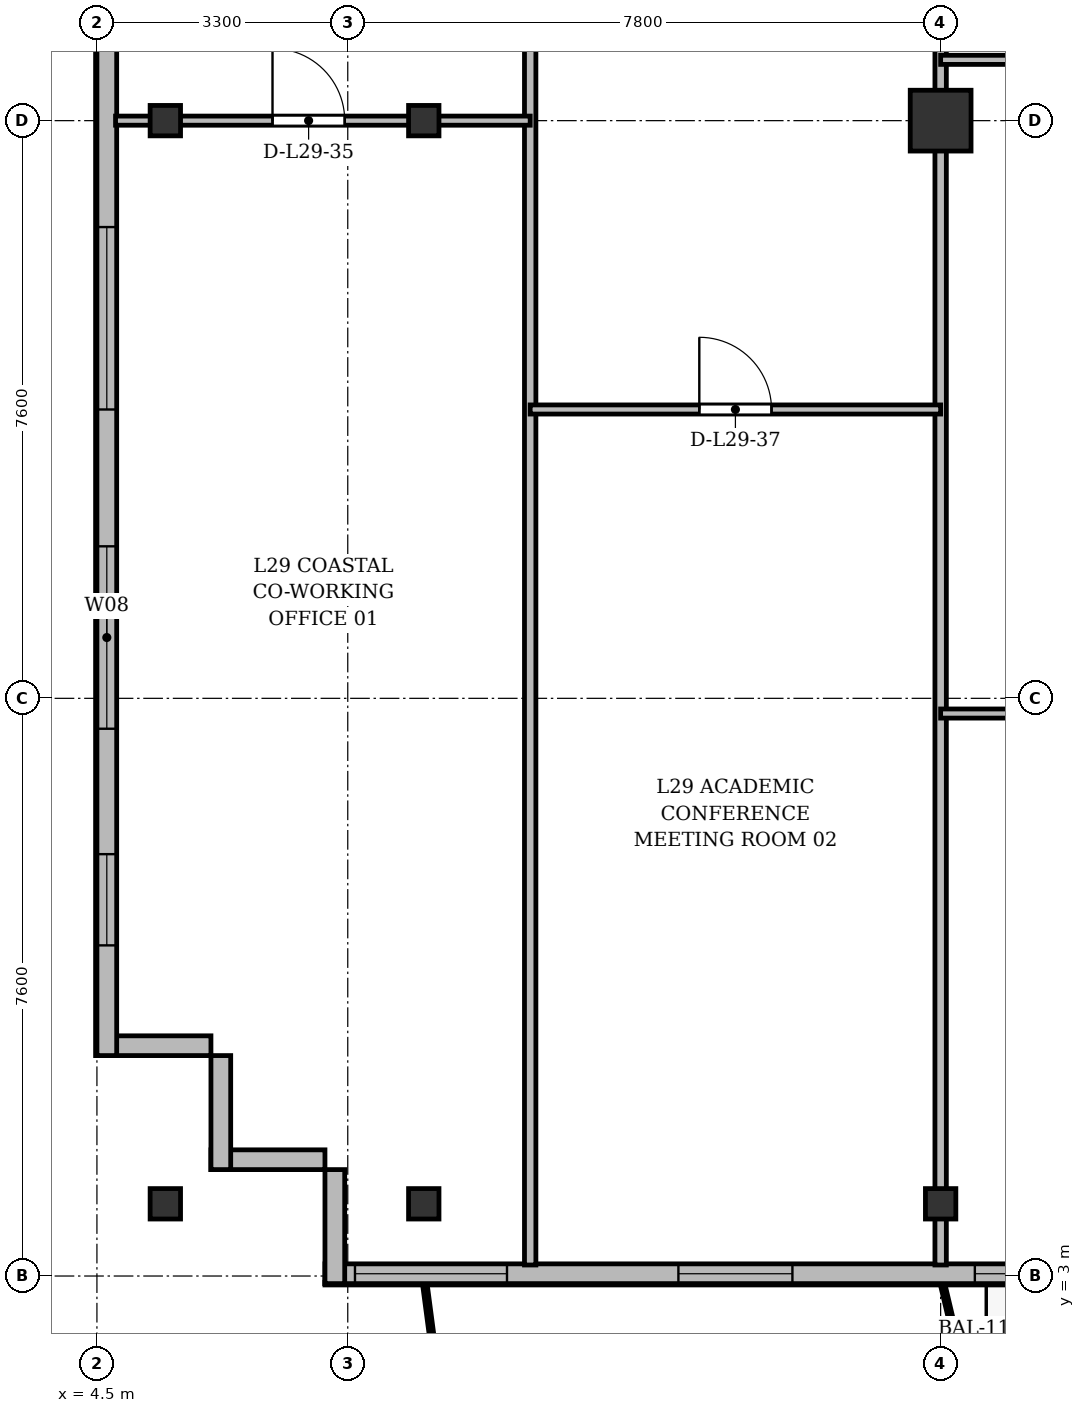
"""IFC4 building model, lengths in metres.
Left out: names, types, materials, properties, quantities, classifications, styles, units other than length and angle.
Written with IfcOpenShell. Run it as: python <this file> out.ifc"""

import sys

from ifc_helpers import new_model, si_unit, direction, frame, frame_2d, origin, origin_2d, place, context, subcontext, project, spatial, rectangle, i_section, extrude, source, transform, mapped, element, fill, save


model = new_model("IFC4")
c1 = context("Model", 3, precision=1e-05, world=origin(), true_north=direction((0.0, 1.0)))
c2 = subcontext(c1, "Body", "Model", "MODEL_VIEW")
j1 = project(units=[si_unit("LENGTHUNIT", "METRE"), si_unit("PLANEANGLEUNIT", "RADIAN")], contexts=[c1])
p1 = place(None, origin())
s1 = spatial("IfcSite", under=j1, at=p1, CompositionType="ELEMENT")
p2 = place(p1, origin())
s2 = spatial("IfcBuilding", under=s1, at=p2, CompositionType="ELEMENT")
p3 = place(p2, frame((0.0, 0.0, 114.1)))
s3 = spatial("IfcBuildingStorey", under=s2, at=p3, CompositionType="ELEMENT", Elevation=114.1)
m1 = source(origin(), c2, "Body", "SweptSolid", [
    extrude(i_section(OverallWidth=0.4, OverallDepth=0.4, WebThickness=0.022, FlangeThickness=0.035, at=origin_2d()), origin(), (0.0, 0.0, 1.0), 3.6),
])
for number, where, z_axis, x_axis in (
    (1, (5.4, 3.95, 0.0), (0.0, 0.0, 1.0), (1.0, 0.0, 0.0)),
    (2, (5.4, 18.2, 0.0), (0.0, 0.0, 1.0), (1.0, 0.0, 0.0)),
    (3, (8.8, 3.95, 0.0), (0.0, 0.0, 1.0), (1.0, 0.0, 0.0)),
    (4, (8.8, 18.2, 0.0), (0.0, 0.0, 1.0), (1.0, 0.0, 0.0)),
    (5, (15.6, 3.95, 0.0), (0.0, 0.0, 1.0), (1.0, 0.0, 0.0)),
):
    element("IfcColumn", number, at=place(p3, frame(where, z_axis=z_axis, x_axis=x_axis)), inside=s3, PredefinedType="COLUMN", context=c2, shape_type="MappedRepresentation", body=[
        mapped(m1, transform((0.0, 0.0, 0.0), x_axis=(1.0, 0.0, 0.0), y_axis=(0.0, 1.0, 0.0), z_axis=(0.0, 0.0, 1.0), scale=1.0)),
    ])
m2 = source(origin(), c2, "Body", "SweptSolid", [
    extrude(rectangle(XDim=0.8, YDim=0.8, at=origin_2d()), origin(), (0.0, 0.0, 1.0), 3.6),
])
p4 = place(p3, frame((15.6, 18.2, 0.0), z_axis=(0.0, 0.0, 1.0), x_axis=(1.0, 0.0, 0.0)))
e6 = element("IfcColumn", 6, at=p4, inside=s3, PredefinedType="COLUMN", context=c2, shape_type="MappedRepresentation", body=[
    mapped(m2, transform((0.0, 0.0, 0.0), x_axis=(1.0, 0.0, 0.0), y_axis=(0.0, 1.0, 0.0), z_axis=(0.0, 0.0, 1.0), scale=1.0)),
])
for number, where, z_axis, x_axis in (
    (7, (7.5, 4.53, 0.0), (0.0, 0.0, 1.0), (-1.0, 0.0, 0.0)),
    (8, (6.13, 4.4, 0.0), (0.0, 0.0, 1.0), (0.0, 1.0, 0.0)),
):
    element("IfcWall", number, at=place(p3, frame(where, z_axis=z_axis, x_axis=x_axis)), inside=s3, PredefinedType="SOLIDWALL", context=c2, shape_type="SweptSolid", body=[
        extrude(rectangle(XDim=1.5, YDim=0.26, at=frame_2d((0.75, 0.0))), origin(), (0.0, 0.0, 1.0), 3.34),
    ])
p5 = place(p3, frame((6.0, 6.03, 0.0), z_axis=(0.0, 0.0, 1.0), x_axis=(-1.0, 0.0, 0.0)))
e9 = element("IfcWall", 9, at=p5, inside=s3, PredefinedType="SOLIDWALL", context=c2, shape_type="SweptSolid", body=[
    extrude(rectangle(XDim=1.5, YDim=0.26, at=frame_2d((0.75, 0.0))), origin(), (0.0, 0.0, 1.0), 2.84),
])
p6 = place(p3, frame((4.63, 5.9, 0.0), z_axis=(0.0, 0.0, 1.0), x_axis=(0.0, 1.0, 0.0)))
e10 = element("IfcWall", 10, at=p6, inside=s3, PredefinedType="SOLIDWALL", context=c2, shape_type="SweptSolid", body=[
    extrude(rectangle(XDim=39.6, YDim=0.26, at=frame_2d((19.8, 0.0))), origin(), (0.0, 0.0, 1.0), 3.34),
])
p7 = place(p6, frame((1.45, 0.0, 0.92)))
e11 = element("IfcOpeningElement", 11, at=p7, cuts=e10, PredefinedType="OPENING", context=c2, shape_type="SweptSolid", body=[
    extrude(rectangle(XDim=1.2, YDim=1.65, at=frame_2d((0.6, 0.825))), frame((0.0, 0.14, 0.0), z_axis=(0.0, -1.0, 0.0), x_axis=(1.0, 0.0, 0.0)), (0.0, 0.0, 1.0), 0.28),
])
p8 = place(p6, frame((4.3, 0.0, 0.92)))
e12 = element("IfcOpeningElement", 12, at=p8, cuts=e10, PredefinedType="OPENING", context=c2, shape_type="SweptSolid", body=[
    extrude(rectangle(XDim=2.4, YDim=2.1, at=frame_2d((1.2, 1.05))), frame((0.0, 0.14, 0.0), z_axis=(0.0, -1.0, 0.0), x_axis=(1.0, 0.0, 0.0)), (0.0, 0.0, 1.0), 0.28),
])
p9 = place(p6, frame((8.5, 0.0, 0.92)))
e13 = element("IfcOpeningElement", 13, at=p9, cuts=e10, PredefinedType="OPENING", context=c2, shape_type="SweptSolid", body=[
    extrude(rectangle(XDim=2.4, YDim=2.1, at=frame_2d((1.2, 1.05))), frame((0.0, 0.14, 0.0), z_axis=(0.0, -1.0, 0.0), x_axis=(1.0, 0.0, 0.0)), (0.0, 0.0, 1.0), 0.28),
])
p10 = place(p6, frame((15.7, 0.0, 0.92)))
e14 = element("IfcOpeningElement", 14, at=p10, cuts=e10, PredefinedType="OPENING", context=c2, shape_type="SweptSolid", body=[
    extrude(rectangle(XDim=2.4, YDim=2.1, at=frame_2d((1.2, 1.05))), frame((0.0, 0.14, 0.0), z_axis=(0.0, -1.0, 0.0), x_axis=(1.0, 0.0, 0.0)), (0.0, 0.0, 1.0), 0.28),
])
p11 = place(p6, frame((33.9, 0.0, 0.92)))
e15 = element("IfcOpeningElement", 15, at=p11, cuts=e10, PredefinedType="OPENING", context=c2, shape_type="SweptSolid", body=[
    extrude(rectangle(XDim=1.2, YDim=1.65, at=frame_2d((0.6, 0.825))), frame((0.0, 0.14, 0.0), z_axis=(0.0, -1.0, 0.0), x_axis=(1.0, 0.0, 0.0)), (0.0, 0.0, 1.0), 0.28),
])
p12 = place(p6, frame((37.25, 0.0, 0.92)))
e16 = element("IfcOpeningElement", 16, at=p12, cuts=e10, PredefinedType="OPENING", context=c2, shape_type="SweptSolid", body=[
    extrude(rectangle(XDim=1.2, YDim=1.65, at=frame_2d((0.6, 0.825))), frame((0.0, 0.14, 0.0), z_axis=(0.0, -1.0, 0.0), x_axis=(1.0, 0.0, 0.0)), (0.0, 0.0, 1.0), 0.28),
])
p13 = place(p3, frame((66.9, 3.03, 0.0), z_axis=(0.0, 0.0, 1.0), x_axis=(-1.0, 0.0, 0.0)))
e17 = element("IfcWall", 17, at=p13, inside=s3, PredefinedType="SOLIDWALL", context=c2, shape_type="SweptSolid", body=[
    extrude(rectangle(XDim=59.4, YDim=0.26, at=frame_2d((29.7, 0.0))), origin(), (0.0, 0.0, 1.0), 3.34),
])
p14 = place(p13, frame((0.47, 0.0, 0.9)))
e18 = element("IfcOpeningElement", 18, at=p14, cuts=e17, PredefinedType="OPENING", context=c2, shape_type="SweptSolid", body=[
    extrude(rectangle(XDim=1.65, YDim=1.85, at=frame_2d((0.825, 0.925))), frame((0.0, 0.14, 0.0), z_axis=(0.0, -1.0, 0.0), x_axis=(1.0, 0.0, 0.0)), (0.0, 0.0, 1.0), 0.28),
])
p15 = place(p13, frame((4.4, 0.0, 0.9)))
e19 = element("IfcOpeningElement", 19, at=p15, cuts=e17, PredefinedType="OPENING", context=c2, shape_type="SweptSolid", body=[
    extrude(rectangle(XDim=1.8, YDim=1.8, at=frame_2d((0.9, 0.9))), frame((0.0, 0.14, 0.0), z_axis=(0.0, -1.0, 0.0), x_axis=(1.0, 0.0, 0.0)), (0.0, 0.0, 1.0), 0.28),
])
p16 = place(p13, frame((10.9, 0.0, 0.9)))
e20 = element("IfcOpeningElement", 20, at=p16, cuts=e17, PredefinedType="OPENING", context=c2, shape_type="SweptSolid", body=[
    extrude(rectangle(XDim=2.2, YDim=1.8, at=frame_2d((1.1, 0.9))), frame((0.0, 0.14, 0.0), z_axis=(0.0, -1.0, 0.0), x_axis=(1.0, 0.0, 0.0)), (0.0, 0.0, 1.0), 0.28),
])
p17 = place(p13, frame((16.92, 0.0, 0.0)))
e21 = element("IfcOpeningElement", 21, at=p17, cuts=e17, PredefinedType="OPENING", context=c2, shape_type="SweptSolid", body=[
    extrude(rectangle(XDim=1.2, YDim=2.2, at=frame_2d((0.6, 1.1))), frame((0.0, 0.14, 0.0), z_axis=(0.0, -1.0, 0.0), x_axis=(1.0, 0.0, 0.0)), (0.0, 0.0, 1.0), 0.28),
])
p18 = place(p13, frame((18.75, 0.0, 0.9)))
e22 = element("IfcOpeningElement", 22, at=p18, cuts=e17, PredefinedType="OPENING", context=c2, shape_type="SweptSolid", body=[
    extrude(rectangle(XDim=1.5, YDim=1.75, at=frame_2d((0.75, 0.875))), frame((0.0, 0.14, 0.0), z_axis=(0.0, -1.0, 0.0), x_axis=(1.0, 0.0, 0.0)), (0.0, 0.0, 1.0), 0.28),
])
p19 = place(p13, frame((21.075, 0.0, 0.9)))
e23 = element("IfcOpeningElement", 23, at=p19, cuts=e17, PredefinedType="OPENING", context=c2, shape_type="SweptSolid", body=[
    extrude(rectangle(XDim=1.65, YDim=1.85, at=frame_2d((0.825, 0.925))), frame((0.0, 0.14, 0.0), z_axis=(0.0, -1.0, 0.0), x_axis=(1.0, 0.0, 0.0)), (0.0, 0.0, 1.0), 0.28),
])
p20 = place(p13, frame((26.5, 0.0, 0.9)))
e24 = element("IfcOpeningElement", 24, at=p20, cuts=e17, PredefinedType="OPENING", context=c2, shape_type="SweptSolid", body=[
    extrude(rectangle(XDim=1.8, YDim=1.8, at=frame_2d((0.9, 0.9))), frame((0.0, 0.14, 0.0), z_axis=(0.0, -1.0, 0.0), x_axis=(1.0, 0.0, 0.0)), (0.0, 0.0, 1.0), 0.28),
])
p21 = place(p13, frame((32.45, 0.0, 0.9)))
e25 = element("IfcOpeningElement", 25, at=p21, cuts=e17, PredefinedType="OPENING", context=c2, shape_type="SweptSolid", body=[
    extrude(rectangle(XDim=2.2, YDim=1.8, at=frame_2d((1.1, 0.9))), frame((0.0, 0.14, 0.0), z_axis=(0.0, -1.0, 0.0), x_axis=(1.0, 0.0, 0.0)), (0.0, 0.0, 1.0), 0.28),
])
p22 = place(p13, frame((36.5, 0.0, 0.9)))
e26 = element("IfcOpeningElement", 26, at=p22, cuts=e17, PredefinedType="OPENING", context=c2, shape_type="SweptSolid", body=[
    extrude(rectangle(XDim=1.5, YDim=1.75, at=frame_2d((0.75, 0.875))), frame((0.0, 0.14, 0.0), z_axis=(0.0, -1.0, 0.0), x_axis=(1.0, 0.0, 0.0)), (0.0, 0.0, 1.0), 0.28),
])
p23 = place(p13, frame((39.6, 0.0, 0.9)))
e27 = element("IfcOpeningElement", 27, at=p23, cuts=e17, PredefinedType="OPENING", context=c2, shape_type="SweptSolid", body=[
    extrude(rectangle(XDim=2.0, YDim=1.95, at=frame_2d((1.0, 0.975))), frame((0.0, 0.14, 0.0), z_axis=(0.0, -1.0, 0.0), x_axis=(1.0, 0.0, 0.0)), (0.0, 0.0, 1.0), 0.28),
])
p24 = place(p13, frame((42.775, 0.0, 0.9)))
e28 = element("IfcOpeningElement", 28, at=p24, cuts=e17, PredefinedType="OPENING", context=c2, shape_type="SweptSolid", body=[
    extrude(rectangle(XDim=1.65, YDim=1.85, at=frame_2d((0.825, 0.925))), frame((0.0, 0.14, 0.0), z_axis=(0.0, -1.0, 0.0), x_axis=(1.0, 0.0, 0.0)), (0.0, 0.0, 1.0), 0.28),
])
p25 = place(p13, frame((46.435, 0.0, 0.0)))
e29 = element("IfcOpeningElement", 29, at=p25, cuts=e17, PredefinedType="OPENING", context=c2, shape_type="SweptSolid", body=[
    extrude(rectangle(XDim=1.2, YDim=2.2, at=frame_2d((0.6, 1.1))), frame((0.0, 0.14, 0.0), z_axis=(0.0, -1.0, 0.0), x_axis=(1.0, 0.0, 0.0)), (0.0, 0.0, 1.0), 0.28),
])
p26 = place(p13, frame((48.65, 0.0, 0.9)))
e30 = element("IfcOpeningElement", 30, at=p26, cuts=e17, PredefinedType="OPENING", context=c2, shape_type="SweptSolid", body=[
    extrude(rectangle(XDim=2.2, YDim=1.8, at=frame_2d((1.1, 0.9))), frame((0.0, 0.14, 0.0), z_axis=(0.0, -1.0, 0.0), x_axis=(1.0, 0.0, 0.0)), (0.0, 0.0, 1.0), 0.28),
])
p27 = place(p13, frame((53.25, 0.0, 0.9)))
e31 = element("IfcOpeningElement", 31, at=p27, cuts=e17, PredefinedType="OPENING", context=c2, shape_type="SweptSolid", body=[
    extrude(rectangle(XDim=1.5, YDim=1.75, at=frame_2d((0.75, 0.875))), frame((0.0, 0.14, 0.0), z_axis=(0.0, -1.0, 0.0), x_axis=(1.0, 0.0, 0.0)), (0.0, 0.0, 1.0), 0.28),
])
p28 = place(p13, frame((57.005, 0.0, 0.9)))
e32 = element("IfcOpeningElement", 32, at=p28, cuts=e17, PredefinedType="OPENING", context=c2, shape_type="SweptSolid", body=[
    extrude(rectangle(XDim=2.0, YDim=1.95, at=frame_2d((1.0, 0.975))), frame((0.0, 0.14, 0.0), z_axis=(0.0, -1.0, 0.0), x_axis=(1.0, 0.0, 0.0)), (0.0, 0.0, 1.0), 0.28),
])
p29 = place(p3, frame((7.63, 2.9, 0.0), z_axis=(0.0, 0.0, 1.0), x_axis=(0.0, 1.0, 0.0)))
e33 = element("IfcWall", 33, at=p29, inside=s3, PredefinedType="SOLIDWALL", context=c2, shape_type="SweptSolid", body=[
    extrude(rectangle(XDim=1.5, YDim=0.26, at=frame_2d((0.75, 0.0))), origin(), (0.0, 0.0, 1.0), 2.752),
])
p30 = place(p3, frame((10.2, 3.145, 0.0), z_axis=(0.0, 0.0, 1.0), x_axis=(0.0, 1.0, 0.0)))
e34 = element("IfcWall", 34, at=p30, inside=s3, PredefinedType="PARTITIONING", context=c2, shape_type="SweptSolid", body=[
    extrude(rectangle(XDim=24.455, YDim=0.15, at=frame_2d((12.228, 0.0))), origin(), (0.0, 0.0, 1.0), 2.752),
])
p31 = place(p3, frame((15.6, 3.145, 0.0), z_axis=(0.0, 0.0, 1.0), x_axis=(0.0, 1.0, 0.0)))
e35 = element("IfcWall", 35, at=p31, inside=s3, PredefinedType="PARTITIONING", context=c2, shape_type="SweptSolid", body=[
    extrude(rectangle(XDim=24.455, YDim=0.15, at=frame_2d((12.228, 0.0))), origin(), (0.0, 0.0, 1.0), 2.84),
])
p32 = place(p3, frame((4.745, 18.2, 0.0), z_axis=(0.0, 0.0, 1.0), x_axis=(1.0, 0.0, 0.0)))
e36 = element("IfcWall", 36, at=p32, inside=s3, PredefinedType="PARTITIONING", context=c2, shape_type="SweptSolid", body=[
    extrude(rectangle(XDim=5.455, YDim=0.12, at=frame_2d((2.728, 0.0))), origin(), (0.0, 0.0, 1.0), 2.752),
])
p33 = place(p32, frame((2.065, 0.0, 0.0)))
e37 = element("IfcOpeningElement", 37, at=p33, cuts=e36, PredefinedType="OPENING", context=c2, shape_type="SweptSolid", body=[
    extrude(rectangle(XDim=0.95, YDim=2.15, at=frame_2d((0.475, 1.075))), frame((0.0, 0.07, 0.0), z_axis=(0.0, -1.0, 0.0), x_axis=(1.0, 0.0, 0.0)), (0.0, 0.0, 1.0), 0.14),
])
p34 = place(p3, frame((10.2, 14.4, 0.0), z_axis=(0.0, 0.0, 1.0), x_axis=(1.0, 0.0, 0.0)))
e38 = element("IfcWall", 38, at=p34, inside=s3, PredefinedType="PARTITIONING", context=c2, shape_type="SweptSolid", body=[
    extrude(rectangle(XDim=5.4, YDim=0.12, at=frame_2d((2.7, 0.0))), origin(), (0.0, 0.0, 1.0), 2.84),
])
p35 = place(p34, frame((2.225, 0.0, 0.0)))
e39 = element("IfcOpeningElement", 39, at=p35, cuts=e38, PredefinedType="OPENING", context=c2, shape_type="SweptSolid", body=[
    extrude(rectangle(XDim=0.95, YDim=2.15, at=frame_2d((0.475, 1.075))), frame((0.0, 0.07, 0.0), z_axis=(0.0, -1.0, 0.0), x_axis=(1.0, 0.0, 0.0)), (0.0, 0.0, 1.0), 0.14),
])
p36 = place(p3, frame((15.6, 19.0, 0.0), z_axis=(0.0, 0.0, 1.0), x_axis=(1.0, 0.0, 0.0)))
e40 = element("IfcWall", 40, at=p36, inside=s3, PredefinedType="PARTITIONING", context=c2, shape_type="SweptSolid", body=[
    extrude(rectangle(XDim=6.2, YDim=0.12, at=frame_2d((3.1, 0.0))), origin(), (0.0, 0.0, 1.0), 2.84),
])
p37 = place(p36, frame((2.625, 0.0, 0.0)))
e41 = element("IfcOpeningElement", 41, at=p37, cuts=e40, PredefinedType="OPENING", context=c2, shape_type="SweptSolid", body=[
    extrude(rectangle(XDim=0.95, YDim=2.15, at=frame_2d((0.475, 1.075))), frame((0.0, 0.07, 0.0), z_axis=(0.0, -1.0, 0.0), x_axis=(1.0, 0.0, 0.0)), (0.0, 0.0, 1.0), 0.14),
])
p38 = place(p3, frame((15.6, 10.4, 0.0), z_axis=(0.0, 0.0, 1.0), x_axis=(1.0, 0.0, 0.0)))
e42 = element("IfcWall", 42, at=p38, inside=s3, PredefinedType="PARTITIONING", context=c2, shape_type="SweptSolid", body=[
    extrude(rectangle(XDim=3.1, YDim=0.12, at=frame_2d((1.55, 0.0))), origin(), (0.0, 0.0, 1.0), 2.84),
])
p39 = place(p38, frame((1.075, 0.0, 0.0)))
e43 = element("IfcOpeningElement", 43, at=p39, cuts=e42, PredefinedType="OPENING", context=c2, shape_type="SweptSolid", body=[
    extrude(rectangle(XDim=0.95, YDim=2.15, at=frame_2d((0.475, 1.075))), frame((0.0, 0.07, 0.0), z_axis=(0.0, -1.0, 0.0), x_axis=(1.0, 0.0, 0.0)), (0.0, 0.0, 1.0), 0.14),
])
m3 = source(origin(), c2, "Body", "SweptSolid", [
    extrude(rectangle(XDim=1.2, YDim=1.65, at=frame_2d((0.6, 0.825))), frame((0.0, 0.03, 0.0), z_axis=(0.0, -1.0, 0.0), x_axis=(1.0, 0.0, 0.0)), (0.0, 0.0, 1.0), 0.06),
])
p40 = place(p7, origin())
e44 = element("IfcWindow", 44, at=p40, inside=s3, PartitioningType="SINGLE_PANEL", PredefinedType="WINDOW", context=c2, shape_type="MappedRepresentation", body=[
    mapped(m3, transform((0.0, 0.0, 0.0), x_axis=(1.0, 0.0, 0.0), y_axis=(0.0, 1.0, 0.0), z_axis=(0.0, 0.0, 1.0), scale=1.0)),
])
fill(e11, e44)
m4 = source(origin(), c2, "Body", "SweptSolid", [
    extrude(rectangle(XDim=2.4, YDim=2.1, at=frame_2d((1.2, 1.05))), frame((0.0, 0.03, 0.0), z_axis=(0.0, -1.0, 0.0), x_axis=(1.0, 0.0, 0.0)), (0.0, 0.0, 1.0), 0.06),
])
p41 = place(p8, origin())
e45 = element("IfcWindow", 45, at=p41, inside=s3, PartitioningType="SINGLE_PANEL", PredefinedType="WINDOW", context=c2, shape_type="MappedRepresentation", body=[
    mapped(m4, transform((0.0, 0.0, 0.0), x_axis=(1.0, 0.0, 0.0), y_axis=(0.0, 1.0, 0.0), z_axis=(0.0, 0.0, 1.0), scale=1.0)),
])
fill(e12, e45)
p42 = place(p9, origin())
e46 = element("IfcWindow", 46, at=p42, inside=s3, PartitioningType="SINGLE_PANEL", PredefinedType="WINDOW", context=c2, shape_type="MappedRepresentation", body=[
    mapped(m4, transform((0.0, 0.0, 0.0), x_axis=(1.0, 0.0, 0.0), y_axis=(0.0, 1.0, 0.0), z_axis=(0.0, 0.0, 1.0), scale=1.0)),
])
fill(e13, e46)
m5 = source(origin(), c2, "Body", "SweptSolid", [
    extrude(rectangle(XDim=2.2, YDim=1.8, at=frame_2d((1.1, 0.9))), frame((0.0, 0.03, 0.0), z_axis=(0.0, -1.0, 0.0), x_axis=(1.0, 0.0, 0.0)), (0.0, 0.0, 1.0), 0.06),
])
p43 = place(p26, origin())
e47 = element("IfcWindow", 47, at=p43, inside=s3, PartitioningType="SINGLE_PANEL", PredefinedType="WINDOW", context=c2, shape_type="MappedRepresentation", body=[
    mapped(m5, transform((0.0, 0.0, 0.0), x_axis=(1.0, 0.0, 0.0), y_axis=(0.0, 1.0, 0.0), z_axis=(0.0, 0.0, 1.0), scale=1.0)),
])
fill(e30, e47)
m6 = source(origin(), c2, "Body", "SweptSolid", [
    extrude(rectangle(XDim=1.5, YDim=1.75, at=frame_2d((0.75, 0.875))), frame((0.0, 0.03, 0.0), z_axis=(0.0, -1.0, 0.0), x_axis=(1.0, 0.0, 0.0)), (0.0, 0.0, 1.0), 0.06),
])
p44 = place(p27, origin())
e48 = element("IfcWindow", 48, at=p44, inside=s3, PartitioningType="SINGLE_PANEL", PredefinedType="WINDOW", context=c2, shape_type="MappedRepresentation", body=[
    mapped(m6, transform((0.0, 0.0, 0.0), x_axis=(1.0, 0.0, 0.0), y_axis=(0.0, 1.0, 0.0), z_axis=(0.0, 0.0, 1.0), scale=1.0)),
])
fill(e31, e48)
m7 = source(origin(), c2, "Body", "SweptSolid", [
    extrude(rectangle(XDim=2.0, YDim=1.95, at=frame_2d((1.0, 0.975))), frame((0.0, 0.03, 0.0), z_axis=(0.0, -1.0, 0.0), x_axis=(1.0, 0.0, 0.0)), (0.0, 0.0, 1.0), 0.06),
])
p45 = place(p28, origin())
e49 = element("IfcWindow", 49, at=p45, inside=s3, PartitioningType="SINGLE_PANEL", PredefinedType="WINDOW", context=c2, shape_type="MappedRepresentation", body=[
    mapped(m7, transform((0.0, 0.0, 0.0), x_axis=(1.0, 0.0, 0.0), y_axis=(0.0, 1.0, 0.0), z_axis=(0.0, 0.0, 1.0), scale=1.0)),
])
fill(e32, e49)
m8 = source(origin(), c2, "Body", "SweptSolid", [
    extrude(rectangle(XDim=0.95, YDim=2.15, at=frame_2d((0.475, 1.075))), frame((0.0, 0.025, 0.0), z_axis=(0.0, -1.0, 0.0), x_axis=(1.0, 0.0, 0.0)), (0.0, 0.0, 1.0), 0.05),
])
p46 = place(p33, origin())
e50 = element("IfcDoor", 50, at=p46, inside=s3, OperationType="SINGLE_SWING_LEFT", PredefinedType="DOOR", context=c2, shape_type="MappedRepresentation", body=[
    mapped(m8, transform((0.0, 0.0, 0.0), x_axis=(1.0, 0.0, 0.0), y_axis=(0.0, 1.0, 0.0), z_axis=(0.0, 0.0, 1.0), scale=1.0)),
])
fill(e37, e50)
p47 = place(p35, origin())
e51 = element("IfcDoor", 51, at=p47, inside=s3, OperationType="SINGLE_SWING_LEFT", PredefinedType="DOOR", context=c2, shape_type="MappedRepresentation", body=[
    mapped(m8, transform((0.0, 0.0, 0.0), x_axis=(1.0, 0.0, 0.0), y_axis=(0.0, 1.0, 0.0), z_axis=(0.0, 0.0, 1.0), scale=1.0)),
])
fill(e39, e51)
save(model, sys.argv[1])
